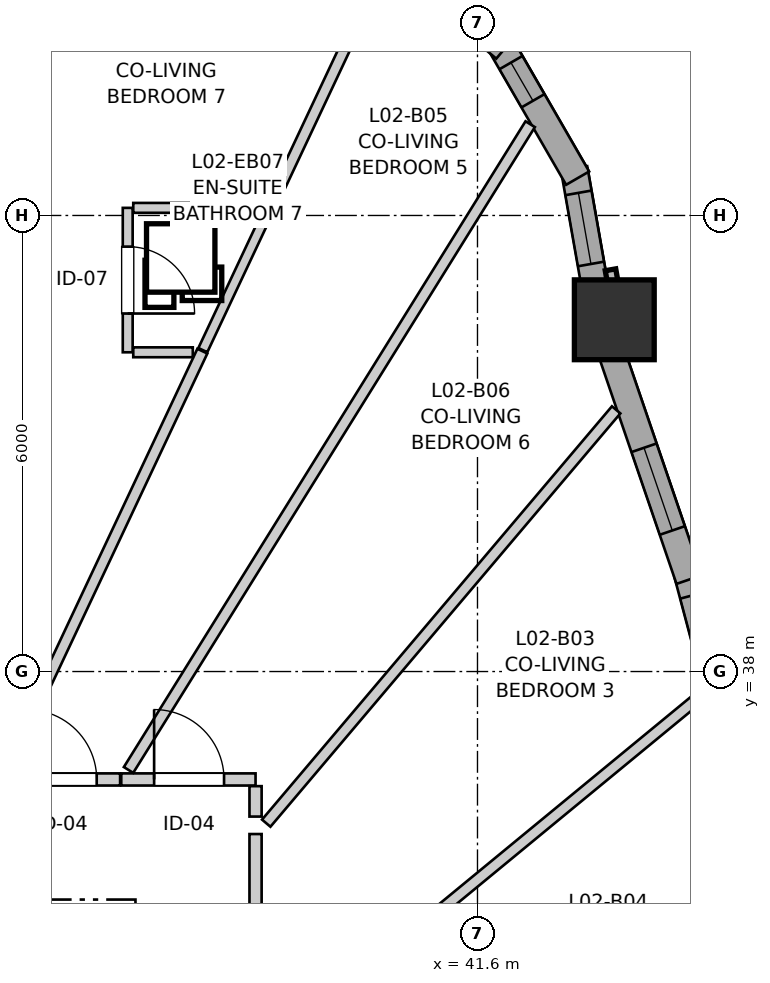
"""IFC4 building model, lengths in metres.
Left out: names, types, materials, properties, quantities, classifications, styles, units other than length and angle.
Written with IfcOpenShell. Run it as: python <this file> out.ifc"""

import sys

from ifc_helpers import new_model, si_unit, direction, frame, frame_2d, origin, origin_2d, place, context, subcontext, project, spatial, rectangle, extrude, source, transform, mapped, element, fill, save


model = new_model("IFC4")
c1 = context("Model", 3, precision=1e-05, world=origin(), true_north=direction((0.0, 1.0)))
c2 = subcontext(c1, "Body", "Model", "MODEL_VIEW")
j1 = project(units=[si_unit("LENGTHUNIT", "METRE"), si_unit("PLANEANGLEUNIT", "RADIAN")], contexts=[c1])
p1 = place(None, origin())
s1 = spatial("IfcSite", under=j1, at=p1, CompositionType="ELEMENT")
p2 = place(p1, origin())
s2 = spatial("IfcBuilding", under=s1, at=p2, CompositionType="ELEMENT")
p3 = place(p2, frame((0.0, 0.0, 11.0)))
s3 = spatial("IfcBuildingStorey", under=s2, at=p3, CompositionType="ELEMENT", Elevation=11.0)
m1 = source(origin(), c2, "Body", "SweptSolid", [
    extrude(rectangle(XDim=1.05, YDim=1.05, at=origin_2d()), origin(), (0.0, 0.0, 1.0), 2.94),
])
p4 = place(p3, frame((43.4, 42.628, 0.0), z_axis=(0.0, 0.0, 1.0), x_axis=(1.0, 0.0, 0.0)))
e1 = element("IfcColumn", 1, at=p4, inside=s3, PredefinedType="COLUMN", context=c2, shape_type="MappedRepresentation", body=[
    mapped(m1, transform((0.0, 0.0, 0.0), x_axis=(1.0, 0.0, 0.0), y_axis=(0.0, 1.0, 0.0), z_axis=(0.0, 0.0, 1.0), scale=1.0)),
])
p5 = place(p3, frame((45.248, 35.951, 0.0), z_axis=(0.0, 0.0, 1.0), x_axis=(-0.25703883136, 0.966401075731, 0.0)))
e2 = element("IfcWall", 2, at=p5, inside=s3, PredefinedType="SOLIDWALL", context=c2, shape_type="SweptSolid", body=[
    extrude(rectangle(XDim=3.459, YDim=0.35, at=frame_2d((1.729, 0.0))), origin(), (0.0, 0.0, 1.0), 2.42),
])
p6 = place(p5, frame((0.329, 0.0, 0.82)))
e3 = element("IfcOpeningElement", 3, at=p6, cuts=e2, PredefinedType="OPENING", context=c2, shape_type="SweptSolid", body=[
    extrude(rectangle(XDim=1.45, YDim=1.25, at=frame_2d((0.725, 0.625))), frame((0.0, 0.185, 0.0), z_axis=(0.0, -1.0, 0.0), x_axis=(1.0, 0.0, 0.0)), (0.0, 0.0, 1.0), 0.37),
])
p7 = place(p5, frame((2.109, 0.0, 0.82)))
e4 = element("IfcOpeningElement", 4, at=p7, cuts=e2, PredefinedType="OPENING", context=c2, shape_type="SweptSolid", body=[
    extrude(rectangle(XDim=1.05, YDim=1.45, at=frame_2d((0.525, 0.725))), frame((0.0, 0.185, 0.0), z_axis=(0.0, -1.0, 0.0), x_axis=(1.0, 0.0, 0.0)), (0.0, 0.0, 1.0), 0.37),
])
p8 = place(p3, frame((44.384, 39.21, 0.0), z_axis=(0.0, 0.0, 1.0), x_axis=(-0.323604561993, 0.946192415663, 0.0)))
e5 = element("IfcWall", 5, at=p8, inside=s3, PredefinedType="SOLIDWALL", context=c2, shape_type="SweptSolid", body=[
    extrude(rectangle(XDim=3.252, YDim=0.35, at=frame_2d((1.626, 0.0))), origin(), (0.0, 0.0, 1.0), 2.42),
])
p9 = place(p8, frame((0.683, 0.0, 0.82)))
e6 = element("IfcOpeningElement", 6, at=p9, cuts=e5, PredefinedType="OPENING", context=c2, shape_type="SweptSolid", body=[
    extrude(rectangle(XDim=1.15, YDim=1.2, at=frame_2d((0.575, 0.6))), frame((0.0, 0.185, 0.0), z_axis=(0.0, -1.0, 0.0), x_axis=(1.0, 0.0, 0.0)), (0.0, 0.0, 1.0), 0.37),
])
p10 = place(p3, frame((43.176, 42.893, 0.0), z_axis=(0.0, 0.0, 1.0), x_axis=(-0.173610462023, 0.984814402553, 0.0)))
e7 = element("IfcWall", 7, at=p10, inside=s3, PredefinedType="SOLIDWALL", context=c2, shape_type="SweptSolid", body=[
    extrude(rectangle(XDim=1.752, YDim=0.35, at=frame_2d((0.876, 0.0))), origin(), (0.0, 0.0, 1.0), 2.42),
])
p11 = place(p10, frame((0.476, 0.0, 0.82)))
e8 = element("IfcOpeningElement", 8, at=p11, cuts=e7, PredefinedType="OPENING", context=c2, shape_type="SweptSolid", body=[
    extrude(rectangle(XDim=0.95, YDim=1.35, at=frame_2d((0.475, 0.675))), frame((0.0, 0.185, 0.0), z_axis=(0.0, -1.0, 0.0), x_axis=(1.0, 0.0, 0.0)), (0.0, 0.0, 1.0), 0.37),
])
p12 = place(p3, frame((42.917, 44.491, 0.0), z_axis=(0.0, 0.0, 1.0), x_axis=(-0.49990781971, 0.866078617559, 0.0)))
e9 = element("IfcWall", 9, at=p12, inside=s3, PredefinedType="SOLIDWALL", context=c2, shape_type="SweptSolid", body=[
    extrude(rectangle(XDim=2.09, YDim=0.35, at=frame_2d((1.045, 0.0))), origin(), (0.0, 0.0, 1.0), 2.42),
])
p13 = place(p12, frame((1.175, 0.0, 0.82)))
e10 = element("IfcOpeningElement", 10, at=p13, cuts=e9, PredefinedType="OPENING", context=c2, shape_type="SweptSolid", body=[
    extrude(rectangle(XDim=0.58, YDim=1.35, at=frame_2d((0.29, 0.675))), frame((0.0, 0.185, 0.0), z_axis=(0.0, -1.0, 0.0), x_axis=(1.0, 0.0, 0.0)), (0.0, 0.0, 1.0), 0.37),
])
p14 = place(p3, frame((41.96, 46.198, 0.0), z_axis=(0.0, 0.0, 1.0), x_axis=(-0.766082082368, 0.642742750308, 0.0)))
e11 = element("IfcWall", 11, at=p14, inside=s3, PredefinedType="SOLIDWALL", context=c2, shape_type="SweptSolid", body=[
    extrude(rectangle(XDim=2.09, YDim=0.35, at=frame_2d((1.045, 0.0))), origin(), (0.0, 0.0, 1.0), 2.42),
])
p15 = place(p14, frame((0.287, 0.0, 0.82)))
e12 = element("IfcOpeningElement", 12, at=p15, cuts=e11, PredefinedType="OPENING", context=c2, shape_type="SweptSolid", body=[
    extrude(rectangle(XDim=1.45, YDim=1.25, at=frame_2d((0.725, 0.625))), frame((0.0, 0.185, 0.0), z_axis=(0.0, -1.0, 0.0), x_axis=(1.0, 0.0, 0.0)), (0.0, 0.0, 1.0), 0.37),
])
p16 = place(p3, frame((38.68, 35.862, 0.0), z_axis=(0.0, 0.0, 1.0), x_axis=(0.0, -1.0, 0.0)))
e13 = element("IfcWall", 13, at=p16, inside=s3, PredefinedType="PARTITIONING", context=c2, shape_type="SweptSolid", body=[
    extrude(rectangle(XDim=3.024, YDim=0.16, at=frame_2d((1.512, 0.0))), origin(), (0.0, 0.0, 1.0), 2.94),
])
p17 = place(p16, frame((1.053, 0.0, 0.0)))
e14 = element("IfcOpeningElement", 14, at=p17, cuts=e13, PredefinedType="OPENING", context=c2, shape_type="SweptSolid", body=[
    extrude(rectangle(XDim=0.92, YDim=2.1, at=frame_2d((0.46, 1.05))), frame((0.0, 0.09, 0.0), z_axis=(0.0, -1.0, 0.0), x_axis=(1.0, 0.0, 0.0)), (0.0, 0.0, 1.0), 0.18),
])
p18 = place(p3, frame((36.998, 44.1, 0.0), z_axis=(0.0, 0.0, 1.0), x_axis=(0.0, -1.0, 0.0)))
e15 = element("IfcWall", 15, at=p18, inside=s3, PredefinedType="PARTITIONING", context=c2, shape_type="SweptSolid", body=[
    extrude(rectangle(XDim=1.9, YDim=0.13, at=frame_2d((0.95, 0.0))), origin(), (0.0, 0.0, 1.0), 2.94),
])
p19 = place(p18, frame((0.51, 0.0, 0.0)))
e16 = element("IfcOpeningElement", 16, at=p19, cuts=e15, PredefinedType="OPENING", context=c2, shape_type="SweptSolid", body=[
    extrude(rectangle(XDim=0.88, YDim=2.05, at=frame_2d((0.44, 1.025))), frame((0.0, 0.075, 0.0), z_axis=(0.0, -1.0, 0.0), x_axis=(1.0, 0.0, 0.0)), (0.0, 0.0, 1.0), 0.15),
])
p20 = place(p3, frame((36.913, 36.58, 0.0), z_axis=(0.0, 0.0, 1.0), x_axis=(1.0, 0.0, 0.0)))
e17 = element("IfcWall", 17, at=p20, inside=s3, PredefinedType="PARTITIONING", context=c2, shape_type="SweptSolid", body=[
    extrude(rectangle(XDim=1.767, YDim=0.16, at=frame_2d((0.883, 0.0))), origin(), (0.0, 0.0, 1.0), 2.94),
])
p21 = place(p20, frame((0.433, 0.0, 0.0)))
e18 = element("IfcOpeningElement", 18, at=p21, cuts=e17, PredefinedType="OPENING", context=c2, shape_type="SweptSolid", body=[
    extrude(rectangle(XDim=0.92, YDim=2.1, at=frame_2d((0.46, 1.05))), frame((0.0, 0.09, 0.0), z_axis=(0.0, -1.0, 0.0), x_axis=(1.0, 0.0, 0.0)), (0.0, 0.0, 1.0), 0.18),
])
p22 = place(p3, frame((35.36, 36.58, 0.0), z_axis=(0.0, 0.0, 1.0), x_axis=(1.0, 0.0, 0.0)))
e19 = element("IfcWall", 19, at=p22, inside=s3, PredefinedType="PARTITIONING", context=c2, shape_type="SweptSolid", body=[
    extrude(rectangle(XDim=1.538, YDim=0.16, at=frame_2d((0.769, 0.0))), origin(), (0.0, 0.0, 1.0), 2.94),
])
p23 = place(p22, frame((0.31, 0.0, 0.0)))
e20 = element("IfcOpeningElement", 20, at=p23, cuts=e19, PredefinedType="OPENING", context=c2, shape_type="SweptSolid", body=[
    extrude(rectangle(XDim=0.92, YDim=2.1, at=frame_2d((0.46, 1.05))), frame((0.0, 0.09, 0.0), z_axis=(0.0, -1.0, 0.0), x_axis=(1.0, 0.0, 0.0)), (0.0, 0.0, 1.0), 0.18),
])
p24 = place(p3, frame((33.169, 36.686, 0.0), z_axis=(0.0, 0.0, 1.0), x_axis=(0.255112522394, 0.966911371801, 0.0)))
e21 = element("IfcWall", 21, at=p24, inside=s3, PredefinedType="PARTITIONING", context=c2, shape_type="SweptSolid", body=[
    extrude(rectangle(XDim=11.469, YDim=0.145, at=frame_2d((5.734, 0.0))), origin(), (0.0, 0.0, 1.0), 2.94),
])
p25 = place(p3, frame((37.009, 36.705, 0.0), z_axis=(0.0, 0.0, 1.0), x_axis=(0.528183829193, 0.849130050451, 0.0)))
e22 = element("IfcWall", 22, at=p25, inside=s3, PredefinedType="PARTITIONING", context=c2, shape_type="SweptSolid", body=[
    extrude(rectangle(XDim=10.005, YDim=0.145, at=frame_2d((5.003, 0.0))), origin(), (0.0, 0.0, 1.0), 2.94),
])
p26 = place(p3, frame((38.812, 32.967, 0.0), z_axis=(0.0, 0.0, 1.0), x_axis=(0.772048037558, 0.635564180633, 0.0)))
e23 = element("IfcWall", 23, at=p26, inside=s3, PredefinedType="PARTITIONING", context=c2, shape_type="SweptSolid", body=[
    extrude(rectangle(XDim=7.477, YDim=0.145, at=frame_2d((3.739, 0.0))), origin(), (0.0, 0.0, 1.0), 2.94),
])
p27 = place(p3, frame((38.821, 36.005, 0.0), z_axis=(0.0, 0.0, 1.0), x_axis=(0.646174151972, 0.76318999294, 0.0)))
e24 = element("IfcWall", 24, at=p27, inside=s3, PredefinedType="PARTITIONING", context=c2, shape_type="SweptSolid", body=[
    extrude(rectangle(XDim=7.125, YDim=0.145, at=frame_2d((3.562, 0.0))), origin(), (0.0, 0.0, 1.0), 2.94),
])
p28 = place(p3, frame((35.385, 36.698, 0.0), z_axis=(0.0, 0.0, 1.0), x_axis=(0.425687116038, 0.904870421242, 0.0)))
e25 = element("IfcWall", 25, at=p28, inside=s3, PredefinedType="PARTITIONING", context=c2, shape_type="SweptSolid", body=[
    extrude(rectangle(XDim=6.097, YDim=0.145, at=frame_2d((3.049, 0.0))), origin(), (0.0, 0.0, 1.0), 2.94),
])
p29 = place(p3, frame((38.783, 43.921, 0.0), z_axis=(0.0, 0.0, 1.0), x_axis=(0.425698730146, 0.904864957412, 0.0)))
e26 = element("IfcWall", 26, at=p29, inside=s3, PredefinedType="PARTITIONING", context=c2, shape_type="SweptSolid", body=[
    extrude(rectangle(XDim=3.708, YDim=0.145, at=frame_2d((1.854, 0.0))), origin(), (0.0, 0.0, 1.0), 2.94),
])
p30 = place(p3, frame((37.987, 42.229, 0.0), z_axis=(0.0, 0.0, 1.0), x_axis=(0.425771690569, 0.904830629184, 0.0)))
e27 = element("IfcWall", 27, at=p30, inside=s3, PredefinedType="PARTITIONING", context=c2, shape_type="SweptSolid", body=[
    extrude(rectangle(XDim=1.855, YDim=0.13, at=frame_2d((0.928, 0.0))), origin(), (0.0, 0.0, 1.0), 2.94),
])
p31 = place(p3, frame((37.071, 44.1, 0.0), z_axis=(0.0, 0.0, 1.0), x_axis=(1.0, 0.0, 0.0)))
e28 = element("IfcWall", 28, at=p31, inside=s3, PredefinedType="PARTITIONING", context=c2, shape_type="SweptSolid", body=[
    extrude(rectangle(XDim=1.608, YDim=0.13, at=frame_2d((0.804, 0.0))), origin(), (0.0, 0.0, 1.0), 2.94),
])
p32 = place(p3, frame((37.071, 42.2, 0.0), z_axis=(0.0, 0.0, 1.0), x_axis=(1.0, 0.0, 0.0)))
e29 = element("IfcWall", 29, at=p32, inside=s3, PredefinedType="PARTITIONING", context=c2, shape_type="SweptSolid", body=[
    extrude(rectangle(XDim=0.783, YDim=0.13, at=frame_2d((0.392, 0.0))), origin(), (0.0, 0.0, 1.0), 2.94),
])
p33 = place(p3, frame((38.68, 36.092, 0.0), z_axis=(0.0, 0.0, 1.0), x_axis=(0.0, 1.0, 0.0)))
e30 = element("IfcWall", 30, at=p33, inside=s3, PredefinedType="PARTITIONING", context=c2, shape_type="SweptSolid", body=[
    extrude(rectangle(XDim=0.4, YDim=0.16, at=frame_2d((0.2, 0.0))), origin(), (0.0, 0.0, 1.0), 2.94),
])
m2 = source(origin(), c2, "Body", "SweptSolid", [
    extrude(rectangle(XDim=1.15, YDim=1.2, at=frame_2d((0.575, 0.6))), frame((0.0, 0.03, 0.0), z_axis=(0.0, -1.0, 0.0), x_axis=(1.0, 0.0, 0.0)), (0.0, 0.0, 1.0), 0.06),
])
p34 = place(p9, origin())
e31 = element("IfcWindow", 31, at=p34, inside=s3, PartitioningType="SINGLE_PANEL", PredefinedType="WINDOW", context=c2, shape_type="MappedRepresentation", body=[
    mapped(m2, transform((0.0, 0.0, 0.0), x_axis=(1.0, 0.0, 0.0), y_axis=(0.0, 1.0, 0.0), z_axis=(0.0, 0.0, 1.0), scale=1.0)),
])
fill(e6, e31)
m3 = source(origin(), c2, "Body", "SweptSolid", [
    extrude(rectangle(XDim=0.95, YDim=1.35, at=frame_2d((0.475, 0.675))), frame((0.0, 0.03, 0.0), z_axis=(0.0, -1.0, 0.0), x_axis=(1.0, 0.0, 0.0)), (0.0, 0.0, 1.0), 0.06),
])
p35 = place(p11, origin())
e32 = element("IfcWindow", 32, at=p35, inside=s3, PartitioningType="SINGLE_PANEL", PredefinedType="WINDOW", context=c2, shape_type="MappedRepresentation", body=[
    mapped(m3, transform((0.0, 0.0, 0.0), x_axis=(1.0, 0.0, 0.0), y_axis=(0.0, 1.0, 0.0), z_axis=(0.0, 0.0, 1.0), scale=1.0)),
])
fill(e8, e32)
m4 = source(origin(), c2, "Body", "SweptSolid", [
    extrude(rectangle(XDim=0.58, YDim=1.35, at=frame_2d((0.29, 0.675))), frame((0.0, 0.03, 0.0), z_axis=(0.0, -1.0, 0.0), x_axis=(1.0, 0.0, 0.0)), (0.0, 0.0, 1.0), 0.06),
])
p36 = place(p13, origin())
e33 = element("IfcWindow", 33, at=p36, inside=s3, PartitioningType="SINGLE_PANEL", PredefinedType="WINDOW", context=c2, shape_type="MappedRepresentation", body=[
    mapped(m4, transform((0.0, 0.0, 0.0), x_axis=(1.0, 0.0, 0.0), y_axis=(0.0, 1.0, 0.0), z_axis=(0.0, 0.0, 1.0), scale=1.0)),
])
fill(e10, e33)
m5 = source(origin(), c2, "Body", "SweptSolid", [
    extrude(rectangle(XDim=0.88, YDim=2.05, at=frame_2d((0.44, 1.025))), frame((0.0, 0.025, 0.0), z_axis=(0.0, -1.0, 0.0), x_axis=(1.0, 0.0, 0.0)), (0.0, 0.0, 1.0), 0.05),
])
p37 = place(p19, origin())
e34 = element("IfcDoor", 34, at=p37, inside=s3, OperationType="SINGLE_SWING_RIGHT", PredefinedType="DOOR", context=c2, shape_type="MappedRepresentation", body=[
    mapped(m5, transform((0.0, 0.0, 0.0), x_axis=(1.0, 0.0, 0.0), y_axis=(0.0, 1.0, 0.0), z_axis=(0.0, 0.0, 1.0), scale=1.0)),
])
fill(e16, e34)
m6 = source(origin(), c2, "Body", "SweptSolid", [
    extrude(rectangle(XDim=0.92, YDim=2.1, at=frame_2d((0.46, 1.05))), frame((0.0, 0.025, 0.0), z_axis=(0.0, -1.0, 0.0), x_axis=(1.0, 0.0, 0.0)), (0.0, 0.0, 1.0), 0.05),
])
p38 = place(p21, origin())
e35 = element("IfcDoor", 35, at=p38, inside=s3, OperationType="SINGLE_SWING_LEFT", PredefinedType="DOOR", context=c2, shape_type="MappedRepresentation", body=[
    mapped(m6, transform((0.0, 0.0, 0.0), x_axis=(1.0, 0.0, 0.0), y_axis=(0.0, 1.0, 0.0), z_axis=(0.0, 0.0, 1.0), scale=1.0)),
])
fill(e18, e35)
p39 = place(p23, origin())
e36 = element("IfcDoor", 36, at=p39, inside=s3, OperationType="SINGLE_SWING_LEFT", PredefinedType="DOOR", context=c2, shape_type="MappedRepresentation", body=[
    mapped(m6, transform((0.0, 0.0, 0.0), x_axis=(1.0, 0.0, 0.0), y_axis=(0.0, 1.0, 0.0), z_axis=(0.0, 0.0, 1.0), scale=1.0)),
])
fill(e20, e36)
save(model, sys.argv[1])
